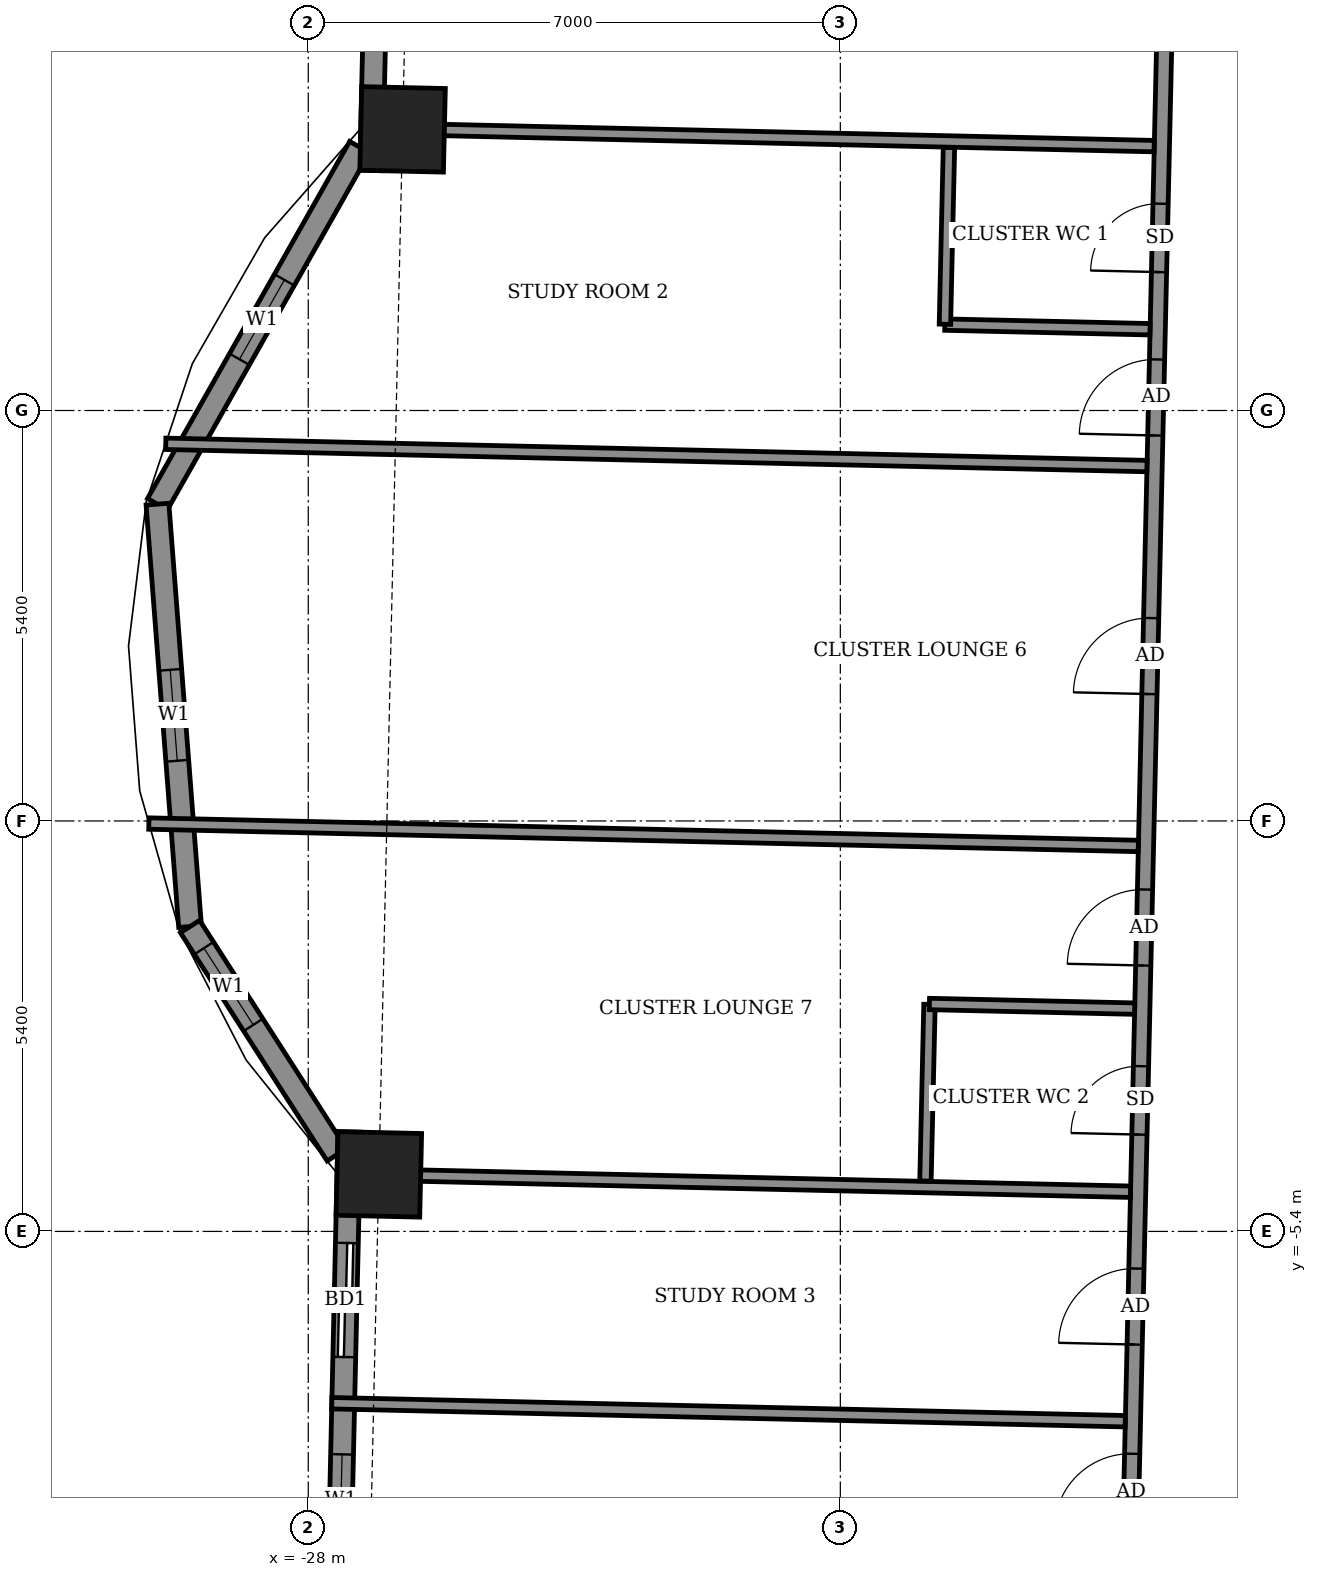
"""IFC4 building model, lengths in metres.
Left out: names, types, materials, properties, quantities, classifications, styles, units other than length and angle.
Written with IfcOpenShell. Run it as: python <this file> out.ifc"""

import sys

from ifc_helpers import new_model, si_unit, direction, frame, frame_2d, origin, origin_2d, place, context, subcontext, project, spatial, rectangle, extrude, element, fill, save


model = new_model("IFC4")
c1 = context("Model", 3, precision=1e-05, world=origin(), true_north=direction((0.0, 1.0)))
c2 = subcontext(c1, "Body", "Model", "MODEL_VIEW")
j1 = project(units=[si_unit("LENGTHUNIT", "METRE"), si_unit("PLANEANGLEUNIT", "RADIAN")], contexts=[c1])
p1 = place(None, origin())
s1 = spatial("IfcSite", under=j1, at=p1, CompositionType="ELEMENT")
p2 = place(p1, origin())
s2 = spatial("IfcBuilding", under=s1, at=p2, CompositionType="ELEMENT")
p3 = place(p2, frame((0.0, 0.0, 208.7)))
s3 = spatial("IfcBuildingStorey", under=s2, at=p3, CompositionType="ELEMENT", Elevation=208.7)
for number, where, z_axis, x_axis in (
    (1, (-27.071, -4.649, -0.55), (0.0, 0.0, 1.0), (-0.023, -1.0, 0.0)),
    (2, (-26.759, 9.099, -0.55), (0.0, 0.0, 1.0), (-0.023, -1.0, 0.0)),
):
    element("IfcColumn", number, at=place(p3, frame(where, z_axis=z_axis, x_axis=x_axis)), inside=s3, PredefinedType="COLUMN", context=c2, shape_type="SweptSolid", body=[
        extrude(rectangle(XDim=1.1, YDim=1.1, at=origin_2d()), origin(), (0.0, 0.0, 1.0), 3.6),
    ])
p4 = place(p3, frame((-26.904, 20.379, 0.0), z_axis=(0.0, 0.0, 1.0), x_axis=(-0.022671687694, -0.999742964255, 0.0)))
e3 = element("IfcWall", 3, at=p4, inside=s3, PredefinedType="SOLIDWALL", context=c2, shape_type="SweptSolid", body=[
    extrude(rectangle(XDim=11.824, YDim=0.3, at=frame_2d((5.912, 0.0))), origin(), (0.0, 0.0, 1.0), 2.55),
])
p5 = place(p4, frame((1.578, 0.0, 0.0)))
e4 = element("IfcOpeningElement", 4, at=p5, cuts=e3, PredefinedType="OPENING", context=c2, shape_type="SweptSolid", body=[
    extrude(rectangle(XDim=1.5, YDim=2.4, at=frame_2d((0.75, 1.2))), frame((0.0, 0.16, 0.0), z_axis=(0.0, -1.0, 0.0), x_axis=(1.0, 0.0, 0.0)), (0.0, 0.0, 1.0), 0.32),
])
p6 = place(p4, frame((7.218, 0.0, 0.9)))
e5 = element("IfcOpeningElement", 5, at=p6, cuts=e3, PredefinedType="OPENING", context=c2, shape_type="SweptSolid", body=[
    extrude(rectangle(XDim=2.4, YDim=1.5, at=frame_2d((1.2, 0.75))), frame((0.0, 0.16, 0.0), z_axis=(0.0, -1.0, 0.0), x_axis=(1.0, 0.0, 0.0)), (0.0, 0.0, 1.0), 0.32),
])
p7 = place(p3, frame((-27.325, 8.866, 0.0), z_axis=(0.0, 0.0, 1.0), x_axis=(-0.492554919955, -0.870281363025, 0.0)))
e6 = element("IfcWall", 6, at=p7, inside=s3, PredefinedType="SOLIDWALL", context=c2, shape_type="SweptSolid", body=[
    extrude(rectangle(XDim=5.398, YDim=0.3, at=frame_2d((2.699, 0.0))), origin(), (0.0, 0.0, 1.0), 3.05),
])
p8 = place(p7, frame((2.008, 0.0, 0.9)))
e7 = element("IfcOpeningElement", 7, at=p8, cuts=e6, PredefinedType="OPENING", context=c2, shape_type="SweptSolid", body=[
    extrude(rectangle(XDim=1.2, YDim=1.5, at=frame_2d((0.6, 0.75))), frame((0.0, 0.16, 0.0), z_axis=(0.0, -1.0, 0.0), x_axis=(1.0, 0.0, 0.0)), (0.0, 0.0, 1.0), 0.32),
])
p9 = place(p3, frame((-29.984, 4.168, 0.0), z_axis=(0.0, 0.0, 1.0), x_axis=(0.076964476481, -0.997033835614, 0.0)))
e8 = element("IfcWall", 8, at=p9, inside=s3, PredefinedType="SOLIDWALL", context=c2, shape_type="SweptSolid", body=[
    extrude(rectangle(XDim=5.573, YDim=0.3, at=frame_2d((2.787, 0.0))), origin(), (0.0, 0.0, 1.0), 3.05),
])
p10 = place(p9, frame((2.186, 0.0, 0.9)))
e9 = element("IfcOpeningElement", 9, at=p10, cuts=e8, PredefinedType="OPENING", context=c2, shape_type="SweptSolid", body=[
    extrude(rectangle(XDim=1.2, YDim=1.5, at=frame_2d((0.6, 0.75))), frame((0.0, 0.16, 0.0), z_axis=(0.0, -1.0, 0.0), x_axis=(1.0, 0.0, 0.0)), (0.0, 0.0, 1.0), 0.32),
])
p11 = place(p3, frame((-29.555, -1.389, 0.0), z_axis=(0.0, 0.0, 1.0), x_axis=(0.540622779574, -0.8412651248, 0.0)))
e10 = element("IfcWall", 10, at=p11, inside=s3, PredefinedType="SOLIDWALL", context=c2, shape_type="SweptSolid", body=[
    extrude(rectangle(XDim=3.57, YDim=0.3, at=frame_2d((1.785, 0.0))), origin(), (0.0, 0.0, 1.0), 3.05),
])
p12 = place(p11, frame((0.338, 0.0, 0.9)))
e11 = element("IfcOpeningElement", 11, at=p12, cuts=e10, PredefinedType="OPENING", context=c2, shape_type="SweptSolid", body=[
    extrude(rectangle(XDim=1.2, YDim=1.5, at=frame_2d((0.6, 0.75))), frame((0.0, 0.16, 0.0), z_axis=(0.0, -1.0, 0.0), x_axis=(1.0, 0.0, 0.0)), (0.0, 0.0, 1.0), 0.32),
])
p13 = place(p3, frame((-27.459, -4.091, 0.0), z_axis=(0.0, 0.0, 1.0), x_axis=(-0.022668325129, -0.999743040504, 0.0)))
e12 = element("IfcWall", 12, at=p13, inside=s3, PredefinedType="SOLIDWALL", context=c2, shape_type="SweptSolid", body=[
    extrude(rectangle(XDim=12.224, YDim=0.3, at=frame_2d((6.112, 0.0))), origin(), (0.0, 0.0, 1.0), 2.55),
])
p14 = place(p13, frame((1.462, 0.0, 0.0)))
e13 = element("IfcOpeningElement", 13, at=p14, cuts=e12, PredefinedType="OPENING", context=c2, shape_type="SweptSolid", body=[
    extrude(rectangle(XDim=1.5, YDim=2.4, at=frame_2d((0.75, 1.2))), frame((0.0, 0.16, 0.0), z_axis=(0.0, -1.0, 0.0), x_axis=(1.0, 0.0, 0.0)), (0.0, 0.0, 1.0), 0.32),
])
p15 = place(p13, frame((4.243, 0.0, 0.9)))
e14 = element("IfcOpeningElement", 14, at=p15, cuts=e12, PredefinedType="OPENING", context=c2, shape_type="SweptSolid", body=[
    extrude(rectangle(XDim=1.2, YDim=1.5, at=frame_2d((0.6, 0.75))), frame((0.0, 0.16, 0.0), z_axis=(0.0, -1.0, 0.0), x_axis=(1.0, 0.0, 0.0)), (0.0, 0.0, 1.0), 0.32),
])
p16 = place(p13, frame((8.45, 0.0, 0.9)))
e15 = element("IfcOpeningElement", 15, at=p16, cuts=e12, PredefinedType="OPENING", context=c2, shape_type="SweptSolid", body=[
    extrude(rectangle(XDim=2.4, YDim=1.5, at=frame_2d((1.2, 0.75))), frame((0.0, 0.16, 0.0), z_axis=(0.0, -1.0, 0.0), x_axis=(1.0, 0.0, 0.0)), (0.0, 0.0, 1.0), 0.32),
])
p17 = place(p3, frame((-17.247, -12.149, 0.0), z_axis=(0.0, 0.0, 1.0), x_axis=(0.022698146637, 0.999742363881, 0.0)))
e16 = element("IfcWall", 16, at=p17, inside=s3, PredefinedType="PARTITIONING", context=c2, shape_type="SweptSolid", body=[
    extrude(rectangle(XDim=28.374, YDim=0.2, at=frame_2d((14.187, 0.0))), origin(), (0.0, 0.0, 1.0), 3.05),
])
p18 = place(p17, frame((17.225, 0.0, 0.0)))
e17 = element("IfcOpeningElement", 17, at=p18, cuts=e16, PredefinedType="OPENING", context=c2, shape_type="SweptSolid", body=[
    extrude(rectangle(XDim=1.0, YDim=2.1, at=frame_2d((0.5, 1.05))), frame((0.0, 0.11, 0.0), z_axis=(0.0, -1.0, 0.0), x_axis=(1.0, 0.0, 0.0)), (0.0, 0.0, 1.0), 0.22),
])
p19 = place(p17, frame((19.375, 0.0, 0.0)))
e18 = element("IfcOpeningElement", 18, at=p19, cuts=e16, PredefinedType="OPENING", context=c2, shape_type="SweptSolid", body=[
    extrude(rectangle(XDim=0.9, YDim=2.1, at=frame_2d((0.45, 1.05))), frame((0.0, 0.11, 0.0), z_axis=(0.0, -1.0, 0.0), x_axis=(1.0, 0.0, 0.0)), (0.0, 0.0, 1.0), 0.22),
])
p20 = place(p17, frame((13.822, 0.0, 0.0)))
e19 = element("IfcOpeningElement", 19, at=p20, cuts=e16, PredefinedType="OPENING", context=c2, shape_type="SweptSolid", body=[
    extrude(rectangle(XDim=1.0, YDim=2.1, at=frame_2d((0.5, 1.05))), frame((0.0, 0.11, 0.0), z_axis=(0.0, -1.0, 0.0), x_axis=(1.0, 0.0, 0.0)), (0.0, 0.0, 1.0), 0.22),
])
p21 = place(p17, frame((10.25, 0.0, 0.0)))
e20 = element("IfcOpeningElement", 20, at=p21, cuts=e16, PredefinedType="OPENING", context=c2, shape_type="SweptSolid", body=[
    extrude(rectangle(XDim=1.0, YDim=2.1, at=frame_2d((0.5, 1.05))), frame((0.0, 0.11, 0.0), z_axis=(0.0, -1.0, 0.0), x_axis=(1.0, 0.0, 0.0)), (0.0, 0.0, 1.0), 0.22),
])
p22 = place(p17, frame((8.025, 0.0, 0.0)))
e21 = element("IfcOpeningElement", 21, at=p22, cuts=e16, PredefinedType="OPENING", context=c2, shape_type="SweptSolid", body=[
    extrude(rectangle(XDim=0.9, YDim=2.1, at=frame_2d((0.45, 1.05))), frame((0.0, 0.11, 0.0), z_axis=(0.0, -1.0, 0.0), x_axis=(1.0, 0.0, 0.0)), (0.0, 0.0, 1.0), 0.22),
])
p23 = place(p17, frame((5.262, 0.0, 0.0)))
e22 = element("IfcOpeningElement", 22, at=p23, cuts=e16, PredefinedType="OPENING", context=c2, shape_type="SweptSolid", body=[
    extrude(rectangle(XDim=1.0, YDim=2.1, at=frame_2d((0.5, 1.05))), frame((0.0, 0.11, 0.0), z_axis=(0.0, -1.0, 0.0), x_axis=(1.0, 0.0, 0.0)), (0.0, 0.0, 1.0), 0.22),
])
p24 = place(p17, frame((2.825, 0.0, 0.0)))
e23 = element("IfcOpeningElement", 23, at=p24, cuts=e16, PredefinedType="OPENING", context=c2, shape_type="SweptSolid", body=[
    extrude(rectangle(XDim=1.0, YDim=2.1, at=frame_2d((0.5, 1.05))), frame((0.0, 0.11, 0.0), z_axis=(0.0, -1.0, 0.0), x_axis=(1.0, 0.0, 0.0)), (0.0, 0.0, 1.0), 0.22),
])
p25 = place(p17, frame((0.75, 0.0, 0.0)))
e24 = element("IfcOpeningElement", 24, at=p25, cuts=e16, PredefinedType="OPENING", context=c2, shape_type="SweptSolid", body=[
    extrude(rectangle(XDim=0.9, YDim=2.1, at=frame_2d((0.45, 1.05))), frame((0.0, 0.11, 0.0), z_axis=(0.0, -1.0, 0.0), x_axis=(1.0, 0.0, 0.0)), (0.0, 0.0, 1.0), 0.22),
])
p26 = place(p3, frame((-27.69, -7.66, 0.0), z_axis=(0.0, 0.0, 1.0), x_axis=(0.99974219758, -0.022705470222, 0.0)))
e25 = element("IfcWall", 25, at=p26, inside=s3, PredefinedType="PARTITIONING", context=c2, shape_type="SweptSolid", body=[
    extrude(rectangle(XDim=10.441, YDim=0.15, at=frame_2d((5.22, 0.0))), origin(), (0.0, 0.0, 1.0), 2.55),
])
p27 = place(p3, frame((-27.322, -4.648, 0.0), z_axis=(0.0, 0.0, 1.0), x_axis=(0.999742841246, -0.022677111331, 0.0)))
e26 = element("IfcWall", 26, at=p27, inside=s3, PredefinedType="PARTITIONING", context=c2, shape_type="SweptSolid", body=[
    extrude(rectangle(XDim=10.142, YDim=0.15, at=frame_2d((5.071, 0.0))), origin(), (0.0, 0.0, 1.0), 3.05),
])
p28 = place(p3, frame((-19.88, -4.737, 0.0), z_axis=(0.0, 0.0, 1.0), x_axis=(0.02279059109, 0.999740260747, 0.0)))
e27 = element("IfcWall", 27, at=p28, inside=s3, PredefinedType="PARTITIONING", context=c2, shape_type="SweptSolid", body=[
    extrude(rectangle(XDim=2.324, YDim=0.15, at=frame_2d((1.162, 0.0))), origin(), (0.0, 0.0, 1.0), 3.05),
])
p29 = place(p3, frame((-19.828, -2.408, 0.0), z_axis=(0.0, 0.0, 1.0), x_axis=(0.99974458177, -0.022600248254, 0.0)))
e28 = element("IfcWall", 28, at=p29, inside=s3, PredefinedType="PARTITIONING", context=c2, shape_type="SweptSolid", body=[
    extrude(rectangle(XDim=2.701, YDim=0.15, at=frame_2d((1.35, 0.0))), origin(), (0.0, 0.0, 1.0), 3.05),
])
p30 = place(p3, frame((-30.097, -0.034, 0.0), z_axis=(0.0, 0.0, 1.0), x_axis=(0.999743005544, -0.022669866904, 0.0)))
e29 = element("IfcWall", 29, at=p30, inside=s3, PredefinedType="PARTITIONING", context=c2, shape_type="SweptSolid", body=[
    extrude(rectangle(XDim=13.02, YDim=0.15, at=frame_2d((6.51, 0.0))), origin(), (0.0, 0.0, 1.0), 2.05),
])
p31 = place(p3, frame((-29.875, 4.962, 0.0), z_axis=(0.0, 0.0, 1.0), x_axis=(0.999742567124, -0.022689193013, 0.0)))
e30 = element("IfcWall", 30, at=p31, inside=s3, PredefinedType="PARTITIONING", context=c2, shape_type="SweptSolid", body=[
    extrude(rectangle(XDim=12.912, YDim=0.15, at=frame_2d((6.456, 0.0))), origin(), (0.0, 0.0, 1.0), 2.05),
])
p32 = place(p3, frame((-19.625, 6.53, 0.0), z_axis=(0.0, 0.0, 1.0), x_axis=(0.999744396973, -0.02260842146, 0.0)))
e31 = element("IfcWall", 31, at=p32, inside=s3, PredefinedType="PARTITIONING", context=c2, shape_type="SweptSolid", body=[
    extrude(rectangle(XDim=2.7, YDim=0.15, at=frame_2d((1.35, 0.0))), origin(), (0.0, 0.0, 1.0), 3.05),
])
p33 = place(p3, frame((-19.624, 6.535, 0.0), z_axis=(0.0, 0.0, 1.0), x_axis=(0.022778632478, 0.99974053329, 0.0)))
e32 = element("IfcWall", 32, at=p33, inside=s3, PredefinedType="PARTITIONING", context=c2, shape_type="SweptSolid", body=[
    extrude(rectangle(XDim=2.326, YDim=0.15, at=frame_2d((1.163, 0.0))), origin(), (0.0, 0.0, 1.0), 3.05),
])
p34 = place(p3, frame((-27.01, 9.108, 0.0), z_axis=(0.0, 0.0, 1.0), x_axis=(0.999742841246, -0.022677111331, 0.0)))
e33 = element("IfcWall", 33, at=p34, inside=s3, PredefinedType="PARTITIONING", context=c2, shape_type="SweptSolid", body=[
    extrude(rectangle(XDim=10.142, YDim=0.15, at=frame_2d((5.071, 0.0))), origin(), (0.0, 0.0, 1.0), 3.05),
])
p35 = place(p8, origin())
e34 = element("IfcWindow", 34, at=p35, inside=s3, PartitioningType="SINGLE_PANEL", PredefinedType="WINDOW", context=c2, shape_type="SweptSolid", body=[
    extrude(rectangle(XDim=1.2, YDim=1.5, at=frame_2d((0.6, 0.75))), frame((0.0, 0.03, 0.0), z_axis=(0.0, -1.0, 0.0), x_axis=(1.0, 0.0, 0.0)), (0.0, 0.0, 1.0), 0.06),
])
fill(e7, e34)
p36 = place(p10, origin())
e35 = element("IfcWindow", 35, at=p36, inside=s3, PartitioningType="SINGLE_PANEL", PredefinedType="WINDOW", context=c2, shape_type="SweptSolid", body=[
    extrude(rectangle(XDim=1.2, YDim=1.5, at=frame_2d((0.6, 0.75))), frame((0.0, 0.03, 0.0), z_axis=(0.0, -1.0, 0.0), x_axis=(1.0, 0.0, 0.0)), (0.0, 0.0, 1.0), 0.06),
])
fill(e9, e35)
p37 = place(p12, origin())
e36 = element("IfcWindow", 36, at=p37, inside=s3, PartitioningType="SINGLE_PANEL", PredefinedType="WINDOW", context=c2, shape_type="SweptSolid", body=[
    extrude(rectangle(XDim=1.2, YDim=1.5, at=frame_2d((0.6, 0.75))), frame((0.0, 0.03, 0.0), z_axis=(0.0, -1.0, 0.0), x_axis=(1.0, 0.0, 0.0)), (0.0, 0.0, 1.0), 0.06),
])
fill(e11, e36)
p38 = place(p14, origin())
e37 = element("IfcDoor", 37, at=p38, inside=s3, OperationType="SLIDING_TO_LEFT", PredefinedType="DOOR", context=c2, shape_type="SweptSolid", body=[
    extrude(rectangle(XDim=1.5, YDim=2.4, at=frame_2d((0.75, 1.2))), frame((0.0, 0.025, 0.0), z_axis=(0.0, -1.0, 0.0), x_axis=(1.0, 0.0, 0.0)), (0.0, 0.0, 1.0), 0.05),
])
fill(e13, e37)
p39 = place(p15, origin())
e38 = element("IfcWindow", 38, at=p39, inside=s3, PartitioningType="SINGLE_PANEL", PredefinedType="WINDOW", context=c2, shape_type="SweptSolid", body=[
    extrude(rectangle(XDim=1.2, YDim=1.5, at=frame_2d((0.6, 0.75))), frame((0.0, 0.03, 0.0), z_axis=(0.0, -1.0, 0.0), x_axis=(1.0, 0.0, 0.0)), (0.0, 0.0, 1.0), 0.06),
])
fill(e14, e38)
p40 = place(p18, origin())
e39 = element("IfcDoor", 39, at=p40, inside=s3, OperationType="SINGLE_SWING_RIGHT", PredefinedType="DOOR", context=c2, shape_type="SweptSolid", body=[
    extrude(rectangle(XDim=1.0, YDim=2.1, at=frame_2d((0.5, 1.05))), frame((0.0, 0.025, 0.0), z_axis=(0.0, -1.0, 0.0), x_axis=(1.0, 0.0, 0.0)), (0.0, 0.0, 1.0), 0.05),
])
fill(e17, e39)
p41 = place(p19, origin())
e40 = element("IfcDoor", 40, at=p41, inside=s3, OperationType="SINGLE_SWING_RIGHT", PredefinedType="DOOR", context=c2, shape_type="SweptSolid", body=[
    extrude(rectangle(XDim=0.9, YDim=2.1, at=frame_2d((0.45, 1.05))), frame((0.0, 0.025, 0.0), z_axis=(0.0, -1.0, 0.0), x_axis=(1.0, 0.0, 0.0)), (0.0, 0.0, 1.0), 0.05),
])
fill(e18, e40)
p42 = place(p20, origin())
e41 = element("IfcDoor", 41, at=p42, inside=s3, OperationType="SINGLE_SWING_LEFT", PredefinedType="DOOR", context=c2, shape_type="SweptSolid", body=[
    extrude(rectangle(XDim=1.0, YDim=2.1, at=frame_2d((0.5, 1.05))), frame((0.0, 0.025, 0.0), z_axis=(0.0, -1.0, 0.0), x_axis=(1.0, 0.0, 0.0)), (0.0, 0.0, 1.0), 0.05),
])
fill(e19, e41)
p43 = place(p21, origin())
e42 = element("IfcDoor", 42, at=p43, inside=s3, OperationType="SINGLE_SWING_RIGHT", PredefinedType="DOOR", context=c2, shape_type="SweptSolid", body=[
    extrude(rectangle(XDim=1.0, YDim=2.1, at=frame_2d((0.5, 1.05))), frame((0.0, 0.025, 0.0), z_axis=(0.0, -1.0, 0.0), x_axis=(1.0, 0.0, 0.0)), (0.0, 0.0, 1.0), 0.05),
])
fill(e20, e42)
p44 = place(p22, origin())
e43 = element("IfcDoor", 43, at=p44, inside=s3, OperationType="SINGLE_SWING_LEFT", PredefinedType="DOOR", context=c2, shape_type="SweptSolid", body=[
    extrude(rectangle(XDim=0.9, YDim=2.1, at=frame_2d((0.45, 1.05))), frame((0.0, 0.025, 0.0), z_axis=(0.0, -1.0, 0.0), x_axis=(1.0, 0.0, 0.0)), (0.0, 0.0, 1.0), 0.05),
])
fill(e21, e43)
p45 = place(p23, origin())
e44 = element("IfcDoor", 44, at=p45, inside=s3, OperationType="SINGLE_SWING_LEFT", PredefinedType="DOOR", context=c2, shape_type="SweptSolid", body=[
    extrude(rectangle(XDim=1.0, YDim=2.1, at=frame_2d((0.5, 1.05))), frame((0.0, 0.025, 0.0), z_axis=(0.0, -1.0, 0.0), x_axis=(1.0, 0.0, 0.0)), (0.0, 0.0, 1.0), 0.05),
])
fill(e22, e44)
p46 = place(p24, origin())
e45 = element("IfcDoor", 45, at=p46, inside=s3, OperationType="SINGLE_SWING_RIGHT", PredefinedType="DOOR", context=c2, shape_type="SweptSolid", body=[
    extrude(rectangle(XDim=1.0, YDim=2.1, at=frame_2d((0.5, 1.05))), frame((0.0, 0.025, 0.0), z_axis=(0.0, -1.0, 0.0), x_axis=(1.0, 0.0, 0.0)), (0.0, 0.0, 1.0), 0.05),
])
fill(e23, e45)
save(model, sys.argv[1])
